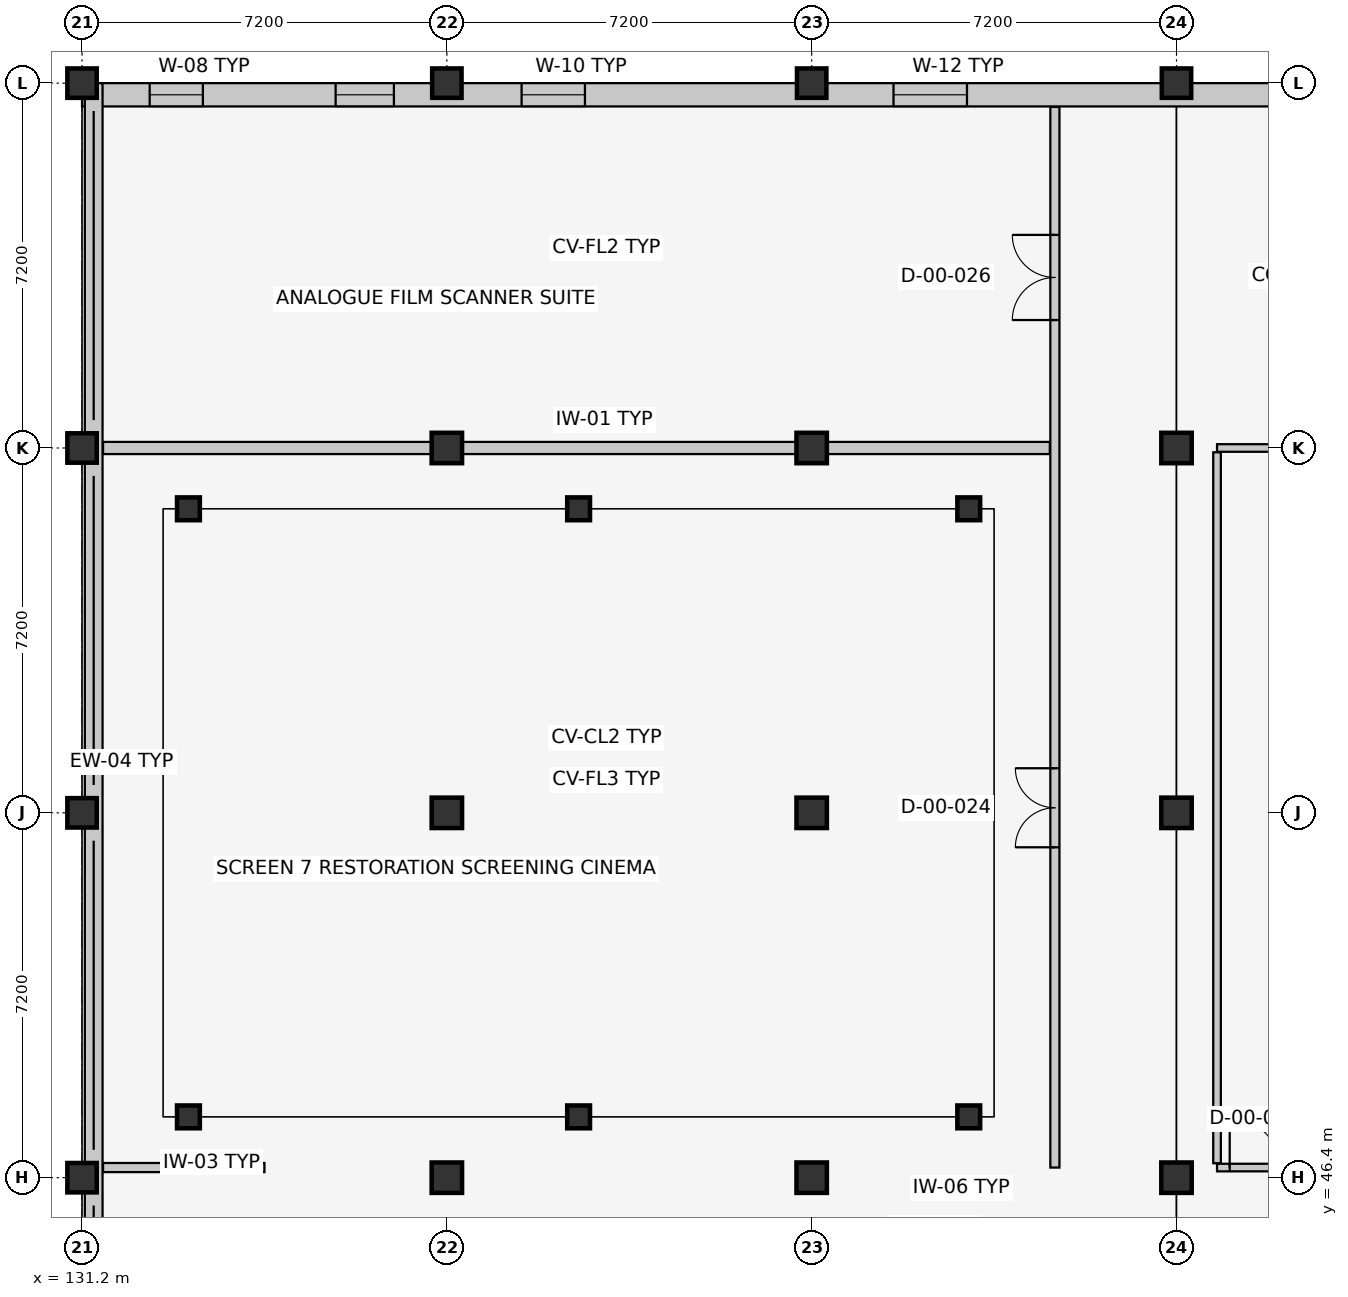
"""IFC4 building model, lengths in metres.
Left out: names, types, materials, properties, quantities, classifications, styles, units other than length and angle.
Written with IfcOpenShell. Run it as: python <this file> out.ifc"""

import sys

from ifc_helpers import new_model, si_unit, direction, frame, frame_2d, origin, origin_2d, place, context, subcontext, project, spatial, rectangle, extrude, element, fill, save


model = new_model("IFC4")
c1 = context("Model", 3, precision=1e-05, world=origin(), true_north=direction((0.0, 1.0)))
c2 = subcontext(c1, "Body", "Model", "MODEL_VIEW")
j1 = project(units=[si_unit("LENGTHUNIT", "METRE"), si_unit("PLANEANGLEUNIT", "RADIAN")], contexts=[c1])
p1 = place(None, origin())
s1 = spatial("IfcSite", under=j1, at=p1, CompositionType="ELEMENT")
p2 = place(p1, origin())
s2 = spatial("IfcBuilding", under=s1, at=p2, CompositionType="ELEMENT")
p3 = place(p2, origin())
s3 = spatial("IfcBuildingStorey", under=s2, at=p3, CompositionType="ELEMENT", Elevation=0.0)
for number, where, z_axis, x_axis in (
    (1, (131.2, 46.4, 0.0), (0.0, 0.0, 1.0), (1.0, 0.0, 0.0)),
    (2, (131.2, 53.6, 0.0), (0.0, 0.0, 1.0), (1.0, 0.0, 0.0)),
    (3, (131.2, 60.8, 0.0), (0.0, 0.0, 1.0), (1.0, 0.0, 0.0)),
    (4, (131.2, 68.0, 0.0), (0.0, 0.0, 1.0), (1.0, 0.0, 0.0)),
):
    element("IfcColumn", number, at=place(p3, frame(where, z_axis=z_axis, x_axis=x_axis)), inside=s3, PredefinedType="COLUMN", context=c2, shape_type="SweptSolid", body=[
        extrude(rectangle(XDim=0.58, YDim=0.58, at=origin_2d()), origin(), (0.0, 0.0, 1.0), 5.4),
    ])
for number, where, z_axis, x_axis in (
    (5, (138.4, 46.4, 0.0), (0.0, 0.0, 1.0), (1.0, 0.0, 0.0)),
    (6, (138.4, 53.6, 0.0), (0.0, 0.0, 1.0), (1.0, 0.0, 0.0)),
    (7, (138.4, 60.8, 0.0), (0.0, 0.0, 1.0), (1.0, 0.0, 0.0)),
):
    element("IfcColumn", number, at=place(p3, frame(where, z_axis=z_axis, x_axis=x_axis)), inside=s3, PredefinedType="COLUMN", context=c2, shape_type="SweptSolid", body=[
        extrude(rectangle(XDim=0.6, YDim=0.6, at=origin_2d()), origin(), (0.0, 0.0, 1.0), 5.4),
    ])
p4 = place(p3, frame((138.4, 68.0, 0.0), z_axis=(0.0, 0.0, 1.0), x_axis=(1.0, 0.0, 0.0)))
e8 = element("IfcColumn", 8, at=p4, inside=s3, PredefinedType="COLUMN", context=c2, shape_type="SweptSolid", body=[
    extrude(rectangle(XDim=0.58, YDim=0.58, at=origin_2d()), origin(), (0.0, 0.0, 1.0), 5.4),
])
for number, where, z_axis, x_axis in (
    (9, (145.6, 46.4, 0.0), (0.0, 0.0, 1.0), (1.0, 0.0, 0.0)),
    (10, (145.6, 53.6, 0.0), (0.0, 0.0, 1.0), (1.0, 0.0, 0.0)),
    (11, (145.6, 60.8, 0.0), (0.0, 0.0, 1.0), (1.0, 0.0, 0.0)),
):
    element("IfcColumn", number, at=place(p3, frame(where, z_axis=z_axis, x_axis=x_axis)), inside=s3, PredefinedType="COLUMN", context=c2, shape_type="SweptSolid", body=[
        extrude(rectangle(XDim=0.6, YDim=0.6, at=origin_2d()), origin(), (0.0, 0.0, 1.0), 5.4),
    ])
p5 = place(p3, frame((145.6, 68.0, 0.0), z_axis=(0.0, 0.0, 1.0), x_axis=(1.0, 0.0, 0.0)))
e12 = element("IfcColumn", 12, at=p5, inside=s3, PredefinedType="COLUMN", context=c2, shape_type="SweptSolid", body=[
    extrude(rectangle(XDim=0.58, YDim=0.58, at=origin_2d()), origin(), (0.0, 0.0, 1.0), 5.4),
])
for number, where, z_axis, x_axis in (
    (13, (152.8, 46.4, 0.0), (0.0, 0.0, 1.0), (1.0, 0.0, 0.0)),
    (14, (152.8, 53.6, 0.0), (0.0, 0.0, 1.0), (1.0, 0.0, 0.0)),
    (15, (152.8, 60.8, 0.0), (0.0, 0.0, 1.0), (1.0, 0.0, 0.0)),
):
    element("IfcColumn", number, at=place(p3, frame(where, z_axis=z_axis, x_axis=x_axis)), inside=s3, PredefinedType="COLUMN", context=c2, shape_type="SweptSolid", body=[
        extrude(rectangle(XDim=0.6, YDim=0.6, at=origin_2d()), origin(), (0.0, 0.0, 1.0), 5.4),
    ])
p6 = place(p3, frame((152.8, 68.0, 0.0), z_axis=(0.0, 0.0, 1.0), x_axis=(1.0, 0.0, 0.0)))
e16 = element("IfcColumn", 16, at=p6, inside=s3, PredefinedType="COLUMN", context=c2, shape_type="SweptSolid", body=[
    extrude(rectangle(XDim=0.58, YDim=0.58, at=origin_2d()), origin(), (0.0, 0.0, 1.0), 5.4),
])
p7 = place(p3, frame((133.3, 47.6, -0.55), z_axis=(0.0, 0.0, 1.0), x_axis=(1.0, 0.0, 0.0)))
e17 = element("IfcColumn", 17, at=p7, inside=s3, PredefinedType="COLUMN", context=c2, shape_type="SweptSolid", body=[
    extrude(rectangle(XDim=0.45, YDim=0.45, at=origin_2d()), origin(), (0.0, 0.0, 1.0), 0.985),
])
p8 = place(p3, frame((133.3, 59.6, -0.55), z_axis=(0.0, 0.0, 1.0), x_axis=(1.0, 0.0, 0.0)))
e18 = element("IfcColumn", 18, at=p8, inside=s3, PredefinedType="COLUMN", context=c2, shape_type="SweptSolid", body=[
    extrude(rectangle(XDim=0.45, YDim=0.45, at=origin_2d()), origin(), (0.0, 0.0, 1.0), 3.455),
])
p9 = place(p3, frame((141.0, 47.6, -0.55), z_axis=(0.0, 0.0, 1.0), x_axis=(1.0, 0.0, 0.0)))
e19 = element("IfcColumn", 19, at=p9, inside=s3, PredefinedType="COLUMN", context=c2, shape_type="SweptSolid", body=[
    extrude(rectangle(XDim=0.45, YDim=0.45, at=origin_2d()), origin(), (0.0, 0.0, 1.0), 0.985),
])
p10 = place(p3, frame((141.0, 59.6, -0.55), z_axis=(0.0, 0.0, 1.0), x_axis=(1.0, 0.0, 0.0)))
e20 = element("IfcColumn", 20, at=p10, inside=s3, PredefinedType="COLUMN", context=c2, shape_type="SweptSolid", body=[
    extrude(rectangle(XDim=0.45, YDim=0.45, at=origin_2d()), origin(), (0.0, 0.0, 1.0), 3.455),
])
p11 = place(p3, frame((148.7, 47.6, -0.55), z_axis=(0.0, 0.0, 1.0), x_axis=(1.0, 0.0, 0.0)))
e21 = element("IfcColumn", 21, at=p11, inside=s3, PredefinedType="COLUMN", context=c2, shape_type="SweptSolid", body=[
    extrude(rectangle(XDim=0.45, YDim=0.45, at=origin_2d()), origin(), (0.0, 0.0, 1.0), 0.985),
])
p12 = place(p3, frame((148.7, 59.6, -0.55), z_axis=(0.0, 0.0, 1.0), x_axis=(1.0, 0.0, 0.0)))
e22 = element("IfcColumn", 22, at=p12, inside=s3, PredefinedType="COLUMN", context=c2, shape_type="SweptSolid", body=[
    extrude(rectangle(XDim=0.45, YDim=0.45, at=origin_2d()), origin(), (0.0, 0.0, 1.0), 3.455),
])
p13 = place(p3, frame((131.2, 67.77, 0.0), z_axis=(0.0, 0.0, 1.0), x_axis=(1.0, 0.0, 0.0)))
e23 = element("IfcWall", 23, at=p13, inside=s3, PredefinedType="SOLIDWALL", context=c2, shape_type="SweptSolid", body=[
    extrude(rectangle(XDim=37.2, YDim=0.46, at=frame_2d((18.6, 0.0))), origin(), (0.0, 0.0, 1.0), 4.315),
])
p14 = place(p13, frame((32.0, 0.0, 0.0)))
e24 = element("IfcOpeningElement", 24, at=p14, cuts=e23, PredefinedType="OPENING", context=c2, shape_type="SweptSolid", body=[
    extrude(rectangle(XDim=2.0, YDim=2.35, at=frame_2d((1.0, 1.175))), frame((0.0, 0.242, 0.0), z_axis=(0.0, -1.0, 0.0), x_axis=(1.0, 0.0, 0.0)), (0.0, 0.0, 1.0), 0.484),
])
p15 = place(p13, frame((1.335, 0.0, 0.9)))
e25 = element("IfcOpeningElement", 25, at=p15, cuts=e23, PredefinedType="OPENING", context=c2, shape_type="SweptSolid", body=[
    extrude(rectangle(XDim=1.05, YDim=1.45, at=frame_2d((0.525, 0.725))), frame((0.0, 0.242, 0.0), z_axis=(0.0, -1.0, 0.0), x_axis=(1.0, 0.0, 0.0)), (0.0, 0.0, 1.0), 0.484),
])
p16 = place(p13, frame((5.005, 0.0, 0.9)))
e26 = element("IfcOpeningElement", 26, at=p16, cuts=e23, PredefinedType="OPENING", context=c2, shape_type="SweptSolid", body=[
    extrude(rectangle(XDim=1.15, YDim=1.45, at=frame_2d((0.575, 0.725))), frame((0.0, 0.242, 0.0), z_axis=(0.0, -1.0, 0.0), x_axis=(1.0, 0.0, 0.0)), (0.0, 0.0, 1.0), 0.484),
])
p17 = place(p13, frame((8.675, 0.0, 0.9)))
e27 = element("IfcOpeningElement", 27, at=p17, cuts=e23, PredefinedType="OPENING", context=c2, shape_type="SweptSolid", body=[
    extrude(rectangle(XDim=1.25, YDim=1.45, at=frame_2d((0.625, 0.725))), frame((0.0, 0.242, 0.0), z_axis=(0.0, -1.0, 0.0), x_axis=(1.0, 0.0, 0.0)), (0.0, 0.0, 1.0), 0.484),
])
p18 = place(p13, frame((16.015, 0.0, 0.9)))
e28 = element("IfcOpeningElement", 28, at=p18, cuts=e23, PredefinedType="OPENING", context=c2, shape_type="SweptSolid", body=[
    extrude(rectangle(XDim=1.45, YDim=1.45, at=frame_2d((0.725, 0.725))), frame((0.0, 0.242, 0.0), z_axis=(0.0, -1.0, 0.0), x_axis=(1.0, 0.0, 0.0)), (0.0, 0.0, 1.0), 0.484),
])
p19 = place(p13, frame((23.655, 0.0, 0.9)))
e29 = element("IfcOpeningElement", 29, at=p19, cuts=e23, PredefinedType="OPENING", context=c2, shape_type="SweptSolid", body=[
    extrude(rectangle(XDim=1.05, YDim=1.6, at=frame_2d((0.525, 0.8))), frame((0.0, 0.242, 0.0), z_axis=(0.0, -1.0, 0.0), x_axis=(1.0, 0.0, 0.0)), (0.0, 0.0, 1.0), 0.484),
])
p20 = place(p3, frame((131.43, 39.2, 0.0), z_axis=(0.0, 0.0, 1.0), x_axis=(0.0, 1.0, 0.0)))
e30 = element("IfcWall", 30, at=p20, inside=s3, PredefinedType="SOLIDWALL", context=c2, shape_type="SweptSolid", body=[
    extrude(rectangle(XDim=28.8, YDim=0.35, at=frame_2d((14.4, 0.0))), origin(), (0.0, 0.0, 1.0), 0.85),
])
p21 = place(p3, frame((131.615, 46.6, 0.0), z_axis=(0.0, 0.0, 1.0), x_axis=(1.0, 0.0, 0.0)))
e31 = element("IfcWall", 31, at=p21, inside=s3, PredefinedType="PARTITIONING", context=c2, shape_type="SweptSolid", body=[
    extrude(rectangle(XDim=3.185, YDim=0.18, at=frame_2d((1.593, 0.0))), origin(), (0.0, 0.0, 1.0), 4.285),
])
p22 = place(p3, frame((150.4, 46.6, 0.0), z_axis=(0.0, 0.0, 1.0), x_axis=(0.0, 1.0, 0.0)))
e32 = element("IfcWall", 32, at=p22, inside=s3, PredefinedType="PARTITIONING", context=c2, shape_type="SweptSolid", body=[
    extrude(rectangle(XDim=20.93, YDim=0.18, at=frame_2d((10.465, 0.0))), origin(), (0.0, 0.0, 1.0), 5.16),
])
p23 = place(p22, frame((6.32, 0.0, 0.0)))
e33 = element("IfcOpeningElement", 33, at=p23, cuts=e32, PredefinedType="OPENING", context=c2, shape_type="SweptSolid", body=[
    extrude(rectangle(XDim=1.56, YDim=2.25, at=frame_2d((0.78, 1.125))), frame((0.0, 0.102, 0.0), z_axis=(0.0, -1.0, 0.0), x_axis=(1.0, 0.0, 0.0)), (0.0, 0.0, 1.0), 0.204),
])
p24 = place(p22, frame((16.725, 0.0, 0.0)))
e34 = element("IfcOpeningElement", 34, at=p24, cuts=e32, PredefinedType="OPENING", context=c2, shape_type="SweptSolid", body=[
    extrude(rectangle(XDim=1.68, YDim=2.3, at=frame_2d((0.84, 1.15))), frame((0.0, 0.102, 0.0), z_axis=(0.0, -1.0, 0.0), x_axis=(1.0, 0.0, 0.0)), (0.0, 0.0, 1.0), 0.204),
])
p25 = place(p3, frame((131.615, 60.8, 0.0), z_axis=(0.0, 0.0, 1.0), x_axis=(1.0, 0.0, 0.0)))
e35 = element("IfcWall", 35, at=p25, inside=s3, PredefinedType="PARTITIONING", context=c2, shape_type="SweptSolid", body=[
    extrude(rectangle(XDim=18.685, YDim=0.24, at=frame_2d((9.343, 0.0))), origin(), (0.0, 0.0, 1.0), 4.285),
])
p26 = place(p3, frame((153.6, 46.6, 0.0), z_axis=(0.0, 0.0, 1.0), x_axis=(1.0, 0.0, 0.0)))
e36 = element("IfcWall", 36, at=p26, inside=s3, PredefinedType="PARTITIONING", context=c2, shape_type="SweptSolid", body=[
    extrude(rectangle(XDim=14.33, YDim=0.15, at=frame_2d((7.165, 0.0))), origin(), (0.0, 0.0, 1.0), 4.185),
])
p27 = place(p26, frame((0.25, 0.0, 0.0)))
e37 = element("IfcOpeningElement", 37, at=p27, cuts=e36, PredefinedType="OPENING", context=c2, shape_type="SweptSolid", body=[
    extrude(rectangle(XDim=0.98, YDim=2.12, at=frame_2d((0.49, 1.06))), frame((0.0, 0.087, 0.0), z_axis=(0.0, -1.0, 0.0), x_axis=(1.0, 0.0, 0.0)), (0.0, 0.0, 1.0), 0.174),
])
p28 = place(p3, frame((153.6, 60.8, 0.0), z_axis=(0.0, 0.0, 1.0), x_axis=(1.0, 0.0, 0.0)))
e38 = element("IfcWall", 38, at=p28, inside=s3, PredefinedType="PARTITIONING", context=c2, shape_type="SweptSolid", body=[
    extrude(rectangle(XDim=14.33, YDim=0.15, at=frame_2d((7.165, 0.0))), origin(), (0.0, 0.0, 1.0), 4.185),
])
p29 = place(p3, frame((153.6, 46.685, 0.0), z_axis=(0.0, 0.0, 1.0), x_axis=(0.0, 1.0, 0.0)))
e39 = element("IfcWall", 39, at=p29, inside=s3, PredefinedType="PARTITIONING", context=c2, shape_type="SweptSolid", body=[
    extrude(rectangle(XDim=14.03, YDim=0.15, at=frame_2d((7.015, 0.0))), origin(), (0.0, 0.0, 1.0), 5.16),
])
p30 = place(p15, origin())
e40 = element("IfcWindow", 40, at=p30, inside=s3, PartitioningType="SINGLE_PANEL", PredefinedType="WINDOW", context=c2, shape_type="SweptSolid", body=[
    extrude(rectangle(XDim=1.05, YDim=1.45, at=frame_2d((0.525, 0.725))), frame((0.0, 0.03, 0.0), z_axis=(0.0, -1.0, 0.0), x_axis=(1.0, 0.0, 0.0)), (0.0, 0.0, 1.0), 0.06),
])
fill(e25, e40)
p31 = place(p16, origin())
e41 = element("IfcWindow", 41, at=p31, inside=s3, PartitioningType="SINGLE_PANEL", PredefinedType="WINDOW", context=c2, shape_type="SweptSolid", body=[
    extrude(rectangle(XDim=1.15, YDim=1.45, at=frame_2d((0.575, 0.725))), frame((0.0, 0.03, 0.0), z_axis=(0.0, -1.0, 0.0), x_axis=(1.0, 0.0, 0.0)), (0.0, 0.0, 1.0), 0.06),
])
fill(e26, e41)
p32 = place(p17, origin())
e42 = element("IfcWindow", 42, at=p32, inside=s3, PartitioningType="SINGLE_PANEL", PredefinedType="WINDOW", context=c2, shape_type="SweptSolid", body=[
    extrude(rectangle(XDim=1.25, YDim=1.45, at=frame_2d((0.625, 0.725))), frame((0.0, 0.03, 0.0), z_axis=(0.0, -1.0, 0.0), x_axis=(1.0, 0.0, 0.0)), (0.0, 0.0, 1.0), 0.06),
])
fill(e27, e42)
p33 = place(p18, origin())
e43 = element("IfcWindow", 43, at=p33, inside=s3, PartitioningType="SINGLE_PANEL", PredefinedType="WINDOW", context=c2, shape_type="SweptSolid", body=[
    extrude(rectangle(XDim=1.45, YDim=1.45, at=frame_2d((0.725, 0.725))), frame((0.0, 0.03, 0.0), z_axis=(0.0, -1.0, 0.0), x_axis=(1.0, 0.0, 0.0)), (0.0, 0.0, 1.0), 0.06),
])
fill(e28, e43)
p34 = place(p23, origin())
e44 = element("IfcDoor", 44, at=p34, inside=s3, OperationType="DOUBLE_DOOR_SINGLE_SWING", PredefinedType="DOOR", context=c2, shape_type="SweptSolid", body=[
    extrude(rectangle(XDim=1.56, YDim=2.25, at=frame_2d((0.78, 1.125))), frame((0.0, 0.025, 0.0), z_axis=(0.0, -1.0, 0.0), x_axis=(1.0, 0.0, 0.0)), (0.0, 0.0, 1.0), 0.05),
])
fill(e33, e44)
p35 = place(p27, origin())
e45 = element("IfcDoor", 45, at=p35, inside=s3, OperationType="SINGLE_SWING_LEFT", PredefinedType="DOOR", context=c2, shape_type="SweptSolid", body=[
    extrude(rectangle(XDim=0.98, YDim=2.12, at=frame_2d((0.49, 1.06))), frame((0.0, 0.025, 0.0), z_axis=(0.0, -1.0, 0.0), x_axis=(1.0, 0.0, 0.0)), (0.0, 0.0, 1.0), 0.05),
])
fill(e37, e45)
p36 = place(p24, origin())
e46 = element("IfcDoor", 46, at=p36, inside=s3, OperationType="DOUBLE_DOOR_SINGLE_SWING", PredefinedType="DOOR", context=c2, shape_type="SweptSolid", body=[
    extrude(rectangle(XDim=1.68, YDim=2.3, at=frame_2d((0.84, 1.15))), frame((0.0, 0.025, 0.0), z_axis=(0.0, -1.0, 0.0), x_axis=(1.0, 0.0, 0.0)), (0.0, 0.0, 1.0), 0.05),
])
fill(e34, e46)
save(model, sys.argv[1])
